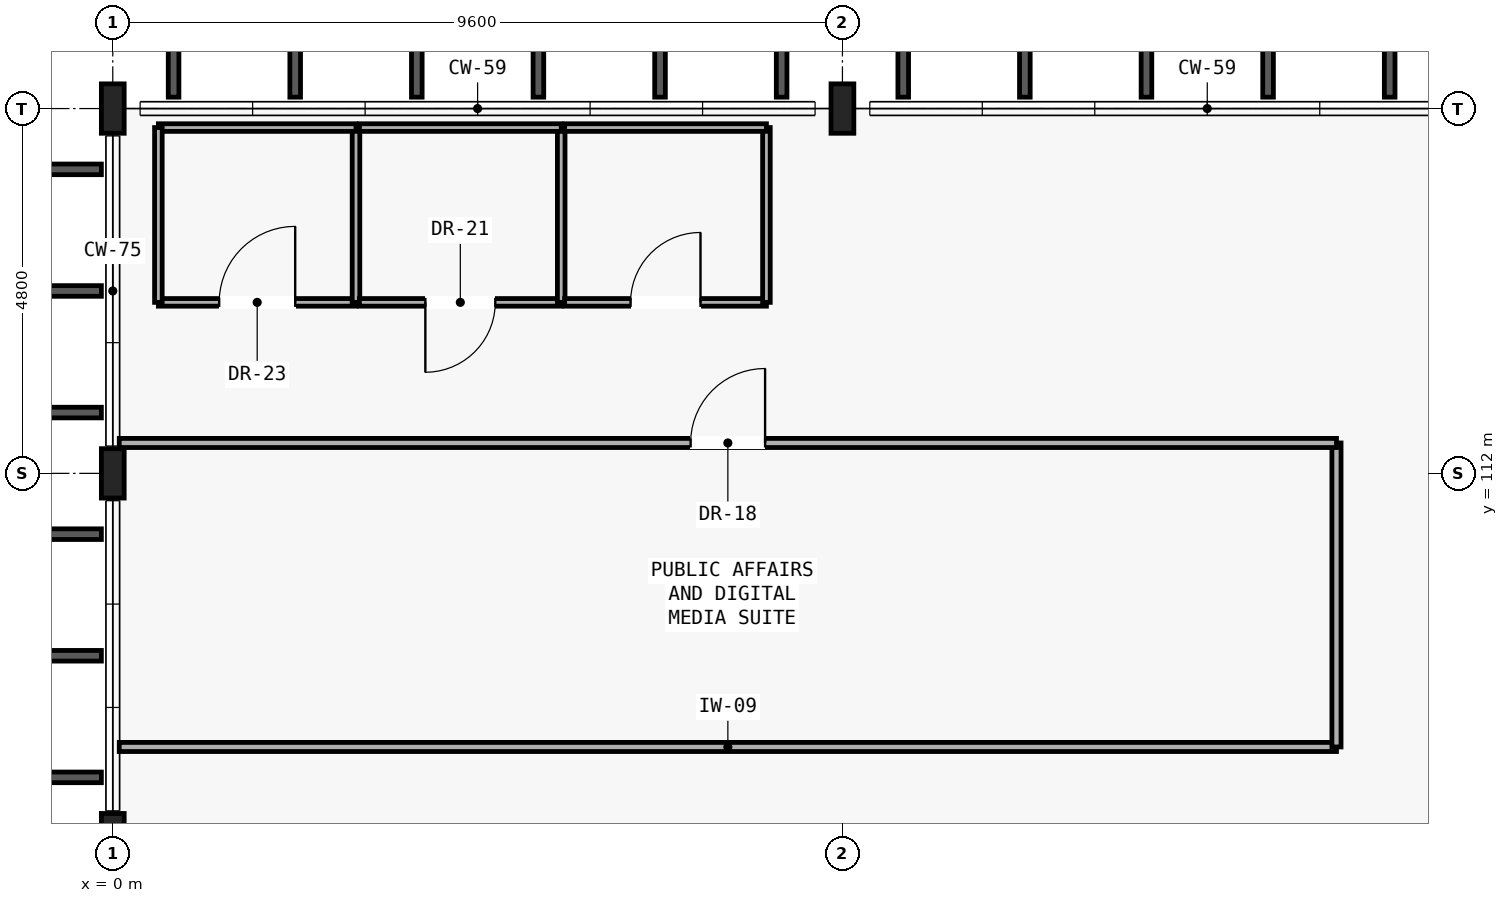
"""IFC4 building model, lengths in metres.
Left out: names, types, materials, properties, quantities, classifications, styles, units other than length and angle.
Written with IfcOpenShell. Run it as: python <this file> out.ifc"""

import sys

from ifc_helpers import new_model, si_unit, direction, frame, frame_2d, origin, origin_2d, place, context, subcontext, project, spatial, rectangle, i_section, extrude, element, fill, save


model = new_model("IFC4")
c1 = context("Model", 3, precision=1e-05, world=origin(), true_north=direction((0.0, 1.0)))
c2 = subcontext(c1, "Body", "Model", "MODEL_VIEW")
j1 = project(units=[si_unit("LENGTHUNIT", "METRE"), si_unit("PLANEANGLEUNIT", "RADIAN")], contexts=[c1])
p1 = place(None, origin())
s1 = spatial("IfcSite", under=j1, at=p1, CompositionType="ELEMENT")
p2 = place(p1, origin())
s2 = spatial("IfcBuilding", under=s1, at=p2, CompositionType="ELEMENT")
p3 = place(p2, frame((0.0, 0.0, 5.25)))
s3 = spatial("IfcBuildingStorey", under=s2, at=p3, CompositionType="ELEMENT", Elevation=5.25)
for number, where, z_axis, x_axis in (
    (1, (0.0, 107.2, 0.0), (0.0, 0.0, 1.0), (1.0, 0.0, 0.0)),
    (2, (0.0, 112.0, 0.0), (0.0, 0.0, 1.0), (1.0, 0.0, 0.0)),
    (3, (0.0, 116.8, 0.0), (0.0, 0.0, 1.0), (1.0, 0.0, 0.0)),
    (4, (9.6, 116.8, 0.0), (0.0, 0.0, 1.0), (1.0, 0.0, 0.0)),
):
    element("IfcColumn", number, at=place(p3, frame(where, z_axis=z_axis, x_axis=x_axis)), inside=s3, PredefinedType="COLUMN", context=c2, shape_type="SweptSolid", body=[
        extrude(i_section(OverallWidth=0.3, OverallDepth=0.65, WebThickness=0.016, FlangeThickness=0.031, FilletRadius=0.027, at=origin_2d()), origin(), (0.0, 0.0, 1.0), 4.2),
    ])
p4 = place(p3, frame((0.085, 108.4, 0.0), z_axis=(0.0, 0.0, 1.0), x_axis=(1.0, 0.0, 0.0)))
e5 = element("IfcWall", 5, at=p4, inside=s3, PredefinedType="PARTITIONING", context=c2, shape_type="SweptSolid", body=[
    extrude(rectangle(XDim=16.015, YDim=0.12, at=frame_2d((8.008, 0.0))), origin(), (0.0, 0.0, 1.0), 3.96),
])
p5 = place(p3, frame((16.1, 108.4, 0.0), z_axis=(0.0, 0.0, 1.0), x_axis=(0.0, 1.0, 0.0)))
e6 = element("IfcWall", 6, at=p5, inside=s3, PredefinedType="PARTITIONING", context=c2, shape_type="SweptSolid", body=[
    extrude(rectangle(XDim=4.0, YDim=0.12, at=frame_2d((2.0, 0.0))), origin(), (0.0, 0.0, 1.0), 3.96),
])
p6 = place(p3, frame((16.1, 112.4, 0.0), z_axis=(0.0, 0.0, 1.0), x_axis=(-1.0, 0.0, 0.0)))
e7 = element("IfcWall", 7, at=p6, inside=s3, PredefinedType="PARTITIONING", context=c2, shape_type="SweptSolid", body=[
    extrude(rectangle(XDim=16.015, YDim=0.12, at=frame_2d((8.008, 0.0))), origin(), (0.0, 0.0, 1.0), 3.96),
])
p7 = place(p6, frame((7.518, 0.0, 0.0)))
e8 = element("IfcOpeningElement", 8, at=p7, cuts=e7, PredefinedType="OPENING", context=c2, shape_type="SweptSolid", body=[
    extrude(rectangle(XDim=0.98, YDim=2.1, at=frame_2d((0.49, 1.05))), frame((0.0, 0.07, 0.0), z_axis=(0.0, -1.0, 0.0), x_axis=(1.0, 0.0, 0.0)), (0.0, 0.0, 1.0), 0.14),
])
p8 = place(p3, frame((0.6, 114.25, 0.0), z_axis=(0.0, 0.0, 1.0), x_axis=(1.0, 0.0, 0.0)))
e9 = element("IfcWall", 9, at=p8, inside=s3, PredefinedType="PARTITIONING", context=c2, shape_type="SweptSolid", body=[
    extrude(rectangle(XDim=2.6, YDim=0.1, at=frame_2d((1.3, 0.0))), origin(), (0.0, 0.0, 1.0), 3.44),
])
p9 = place(p8, frame((0.8, 0.0, 0.0)))
e10 = element("IfcOpeningElement", 10, at=p9, cuts=e9, PredefinedType="OPENING", context=c2, shape_type="SweptSolid", body=[
    extrude(rectangle(XDim=1.0, YDim=2.08, at=frame_2d((0.5, 1.04))), frame((0.0, 0.06, 0.0), z_axis=(0.0, -1.0, 0.0), x_axis=(1.0, 0.0, 0.0)), (0.0, 0.0, 1.0), 0.12),
])
p10 = place(p3, frame((3.2, 114.25, 0.0), z_axis=(0.0, 0.0, 1.0), x_axis=(0.0, 1.0, 0.0)))
e11 = element("IfcWall", 11, at=p10, inside=s3, PredefinedType="PARTITIONING", context=c2, shape_type="SweptSolid", body=[
    extrude(rectangle(XDim=2.3, YDim=0.1, at=frame_2d((1.15, 0.0))), origin(), (0.0, 0.0, 1.0), 3.96),
])
p11 = place(p3, frame((3.2, 116.55, 0.0), z_axis=(0.0, 0.0, 1.0), x_axis=(-1.0, 0.0, 0.0)))
e12 = element("IfcWall", 12, at=p11, inside=s3, PredefinedType="PARTITIONING", context=c2, shape_type="SweptSolid", body=[
    extrude(rectangle(XDim=2.6, YDim=0.1, at=frame_2d((1.3, 0.0))), origin(), (0.0, 0.0, 1.0), 3.14),
])
p12 = place(p3, frame((0.6, 116.55, 0.0), z_axis=(0.0, 0.0, 1.0), x_axis=(0.0, -1.0, 0.0)))
e13 = element("IfcWall", 13, at=p12, inside=s3, PredefinedType="PARTITIONING", context=c2, shape_type="SweptSolid", body=[
    extrude(rectangle(XDim=2.3, YDim=0.1, at=frame_2d((1.15, 0.0))), origin(), (0.0, 0.0, 1.0), 3.96),
])
p13 = place(p3, frame((3.245, 114.25, 0.0), z_axis=(0.0, 0.0, 1.0), x_axis=(1.0, 0.0, 0.0)))
e14 = element("IfcWall", 14, at=p13, inside=s3, PredefinedType="PARTITIONING", context=c2, shape_type="SweptSolid", body=[
    extrude(rectangle(XDim=2.655, YDim=0.1, at=frame_2d((1.327, 0.0))), origin(), (0.0, 0.0, 1.0), 3.44),
])
p14 = place(p13, frame((0.867, 0.0, 0.0)))
e15 = element("IfcOpeningElement", 15, at=p14, cuts=e14, PredefinedType="OPENING", context=c2, shape_type="SweptSolid", body=[
    extrude(rectangle(XDim=0.92, YDim=2.08, at=frame_2d((0.46, 1.04))), frame((0.0, 0.06, 0.0), z_axis=(0.0, -1.0, 0.0), x_axis=(1.0, 0.0, 0.0)), (0.0, 0.0, 1.0), 0.12),
])
p15 = place(p3, frame((5.9, 114.25, 0.0), z_axis=(0.0, 0.0, 1.0), x_axis=(0.0, 1.0, 0.0)))
e16 = element("IfcWall", 16, at=p15, inside=s3, PredefinedType="PARTITIONING", context=c2, shape_type="SweptSolid", body=[
    extrude(rectangle(XDim=2.3, YDim=0.1, at=frame_2d((1.15, 0.0))), origin(), (0.0, 0.0, 1.0), 3.96),
])
p16 = place(p3, frame((5.9, 116.55, 0.0), z_axis=(0.0, 0.0, 1.0), x_axis=(-1.0, 0.0, 0.0)))
e17 = element("IfcWall", 17, at=p16, inside=s3, PredefinedType="PARTITIONING", context=c2, shape_type="SweptSolid", body=[
    extrude(rectangle(XDim=2.655, YDim=0.1, at=frame_2d((1.327, 0.0))), origin(), (0.0, 0.0, 1.0), 3.14),
])
p17 = place(p3, frame((5.945, 114.25, 0.0), z_axis=(0.0, 0.0, 1.0), x_axis=(1.0, 0.0, 0.0)))
e18 = element("IfcWall", 18, at=p17, inside=s3, PredefinedType="PARTITIONING", context=c2, shape_type="SweptSolid", body=[
    extrude(rectangle(XDim=2.655, YDim=0.1, at=frame_2d((1.328, 0.0))), origin(), (0.0, 0.0, 1.0), 3.44),
])
p18 = place(p17, frame((0.867, 0.0, 0.0)))
e19 = element("IfcOpeningElement", 19, at=p18, cuts=e18, PredefinedType="OPENING", context=c2, shape_type="SweptSolid", body=[
    extrude(rectangle(XDim=0.92, YDim=2.08, at=frame_2d((0.46, 1.04))), frame((0.0, 0.06, 0.0), z_axis=(0.0, -1.0, 0.0), x_axis=(1.0, 0.0, 0.0)), (0.0, 0.0, 1.0), 0.12),
])
p19 = place(p3, frame((8.6, 114.25, 0.0), z_axis=(0.0, 0.0, 1.0), x_axis=(0.0, 1.0, 0.0)))
e20 = element("IfcWall", 20, at=p19, inside=s3, PredefinedType="PARTITIONING", context=c2, shape_type="SweptSolid", body=[
    extrude(rectangle(XDim=2.3, YDim=0.1, at=frame_2d((1.15, 0.0))), origin(), (0.0, 0.0, 1.0), 3.96),
])
p20 = place(p3, frame((8.6, 116.55, 0.0), z_axis=(0.0, 0.0, 1.0), x_axis=(-1.0, 0.0, 0.0)))
e21 = element("IfcWall", 21, at=p20, inside=s3, PredefinedType="PARTITIONING", context=c2, shape_type="SweptSolid", body=[
    extrude(rectangle(XDim=2.655, YDim=0.1, at=frame_2d((1.328, 0.0))), origin(), (0.0, 0.0, 1.0), 3.14),
])
p21 = place(p7, frame((0.98, 0.0, 0.0), z_axis=(0.0, 0.0, 1.0), x_axis=(-1.0, 0.0, 0.0)))
e22 = element("IfcDoor", 22, at=p21, inside=s3, OperationType="SINGLE_SWING_LEFT", PredefinedType="DOOR", context=c2, shape_type="SweptSolid", body=[
    extrude(rectangle(XDim=0.98, YDim=2.1, at=frame_2d((0.49, 1.05))), frame((0.0, 0.025, 0.0), z_axis=(0.0, -1.0, 0.0), x_axis=(1.0, 0.0, 0.0)), (0.0, 0.0, 1.0), 0.05),
])
fill(e8, e22)
p22 = place(p9, origin())
e23 = element("IfcDoor", 23, at=p22, inside=s3, OperationType="SINGLE_SWING_RIGHT", PredefinedType="DOOR", context=c2, shape_type="SweptSolid", body=[
    extrude(rectangle(XDim=1.0, YDim=2.08, at=frame_2d((0.5, 1.04))), frame((0.0, 0.025, 0.0), z_axis=(0.0, -1.0, 0.0), x_axis=(1.0, 0.0, 0.0)), (0.0, 0.0, 1.0), 0.05),
])
fill(e10, e23)
p23 = place(p14, frame((0.92, 0.0, 0.0), z_axis=(0.0, 0.0, 1.0), x_axis=(-1.0, 0.0, 0.0)))
e24 = element("IfcDoor", 24, at=p23, inside=s3, OperationType="SINGLE_SWING_LEFT", PredefinedType="DOOR", context=c2, shape_type="SweptSolid", body=[
    extrude(rectangle(XDim=0.92, YDim=2.08, at=frame_2d((0.46, 1.04))), frame((0.0, 0.025, 0.0), z_axis=(0.0, -1.0, 0.0), x_axis=(1.0, 0.0, 0.0)), (0.0, 0.0, 1.0), 0.05),
])
fill(e15, e24)
p24 = place(p18, origin())
e25 = element("IfcDoor", 25, at=p24, inside=s3, OperationType="SINGLE_SWING_RIGHT", PredefinedType="DOOR", context=c2, shape_type="SweptSolid", body=[
    extrude(rectangle(XDim=0.92, YDim=2.08, at=frame_2d((0.46, 1.04))), frame((0.0, 0.025, 0.0), z_axis=(0.0, -1.0, 0.0), x_axis=(1.0, 0.0, 0.0)), (0.0, 0.0, 1.0), 0.05),
])
fill(e19, e25)
save(model, sys.argv[1])
